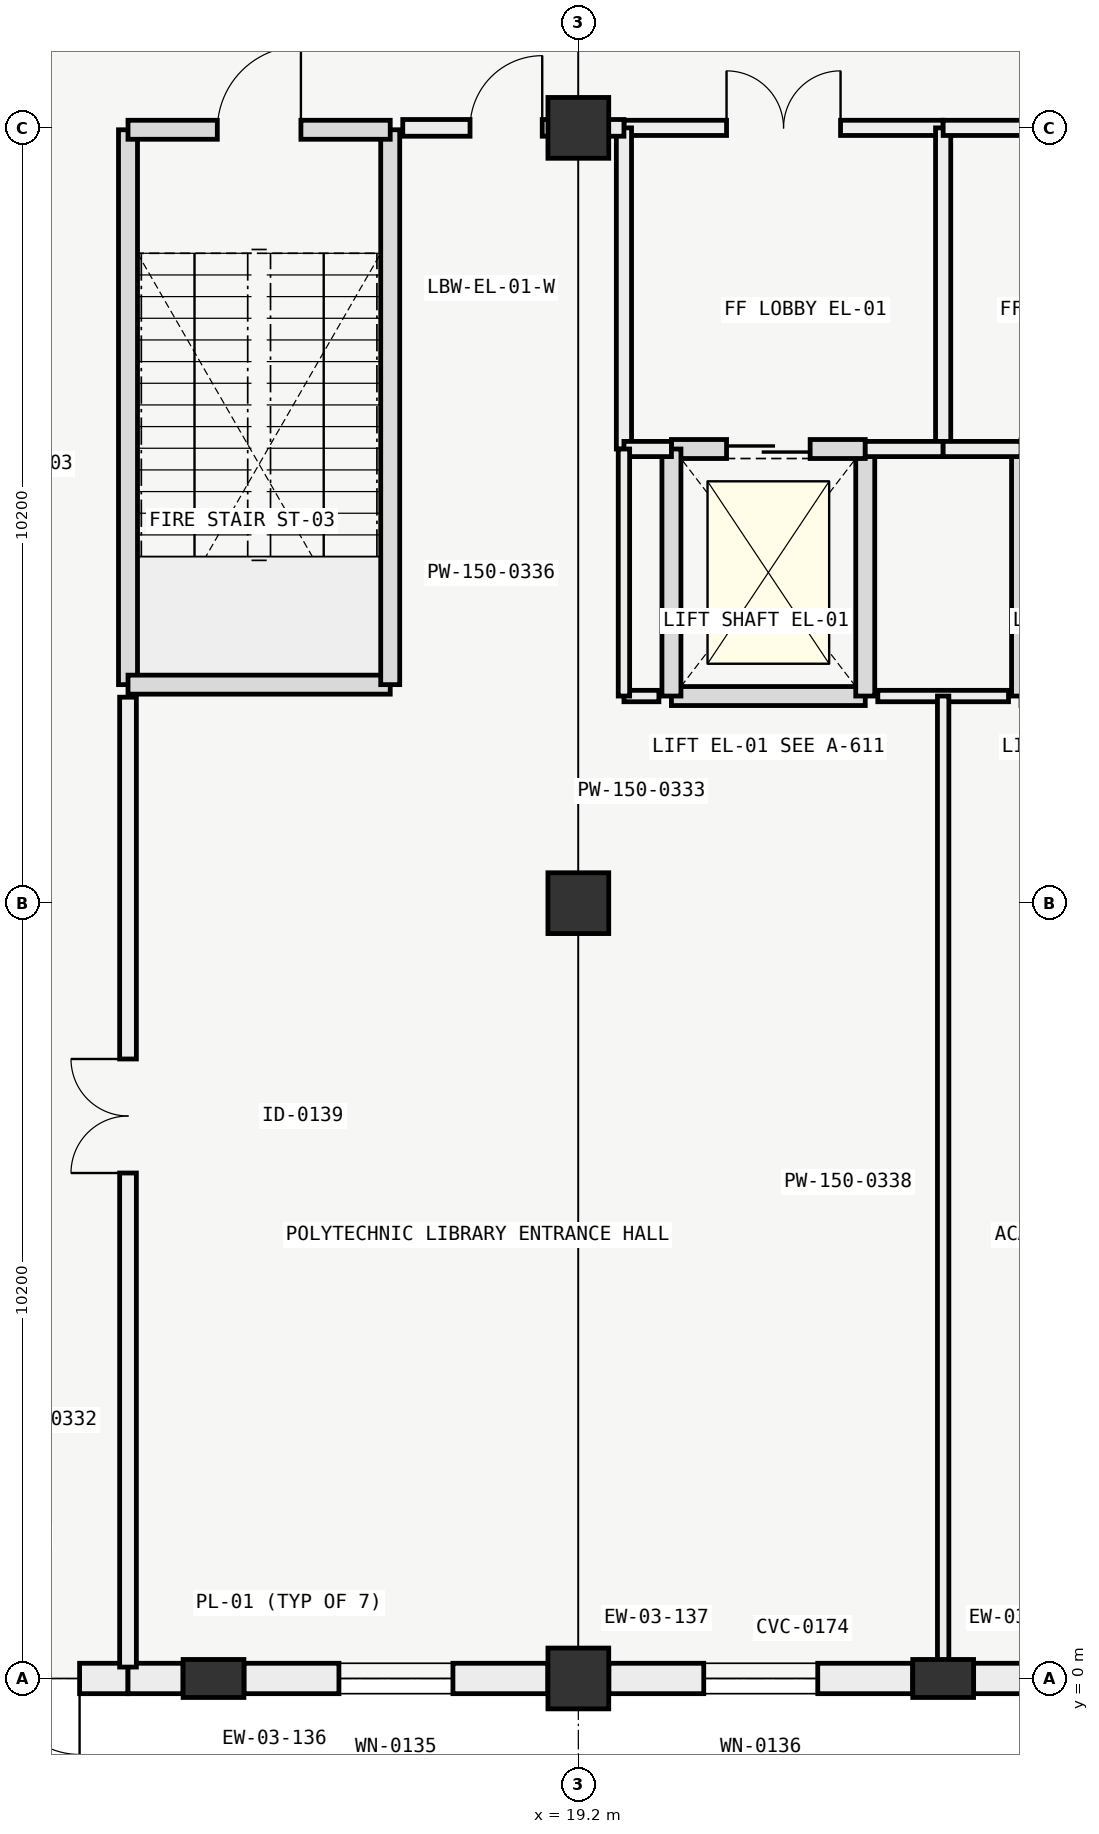
"""IFC4 building model, lengths in metres.
Left out: names, types, materials, properties, quantities, classifications, styles, units other than length and angle.
Written with IfcOpenShell. Run it as: python <this file> out.ifc"""

import sys

from ifc_helpers import new_model, si_unit, direction, frame, frame_2d, origin, origin_2d, place, context, subcontext, project, spatial, rectangle, extrude, element, fill, save


model = new_model("IFC4")
c1 = context("Model", 3, precision=1e-05, world=origin(), true_north=direction((0.0, 1.0)))
c2 = subcontext(c1, "Body", "Model", "MODEL_VIEW")
j1 = project(units=[si_unit("LENGTHUNIT", "METRE"), si_unit("PLANEANGLEUNIT", "RADIAN")], contexts=[c1])
p1 = place(None, origin())
s1 = spatial("IfcSite", under=j1, at=p1, CompositionType="ELEMENT")
p2 = place(p1, origin())
s2 = spatial("IfcBuilding", under=s1, at=p2, CompositionType="ELEMENT")
p3 = place(p2, origin())
s3 = spatial("IfcBuildingStorey", under=s2, at=p3, CompositionType="ELEMENT", Elevation=0.0)
for number, where, z_axis, x_axis in (
    (1, (19.2, 0.0, 0.0), (0.0, 0.0, 1.0), (1.0, 0.0, 0.0)),
    (2, (19.2, 10.2, 0.0), (0.0, 0.0, 1.0), (1.0, 0.0, 0.0)),
    (3, (19.2, 20.4, 0.0), (0.0, 0.0, 1.0), (1.0, 0.0, 0.0)),
):
    element("IfcColumn", number, at=place(p3, frame(where, z_axis=z_axis, x_axis=x_axis)), inside=s3, PredefinedType="COLUMN", context=c2, shape_type="SweptSolid", body=[
        extrude(rectangle(XDim=0.8, YDim=0.8, at=origin_2d()), origin(), (0.0, 0.0, 1.0), 5.4),
    ])
for number, where, z_axis, x_axis in (
    (4, (14.4, 0.0, 0.0), (0.0, 0.0, 1.0), (0.0, 1.0, 0.0)),
    (5, (24.0, 0.0, 0.0), (0.0, 0.0, 1.0), (0.0, 1.0, 0.0)),
):
    element("IfcColumn", number, at=place(p3, frame(where, z_axis=z_axis, x_axis=x_axis)), inside=s3, PredefinedType="PILASTER", context=c2, shape_type="SweptSolid", body=[
        extrude(rectangle(XDim=0.5, YDim=0.8, at=origin_2d()), origin(), (0.0, 0.0, 1.0), 5.4),
    ])
p4 = place(p3, frame((13.275, 0.0, 0.0), z_axis=(0.0, 0.0, 1.0), x_axis=(-1.0, 0.0, 0.0)))
e6 = element("IfcWall", 6, at=p4, inside=s3, PredefinedType="SOLIDWALL", context=c2, shape_type="SweptSolid", body=[
    extrude(rectangle(XDim=3.274, YDim=0.4, at=frame_2d((1.637, 0.0))), origin(), (0.0, 0.0, 1.0), 3.58),
])
p5 = place(p4, frame((0.637, 0.0, 0.0)))
e7 = element("IfcOpeningElement", 7, at=p5, cuts=e6, PredefinedType="OPENING", context=c2, shape_type="SweptSolid", body=[
    extrude(rectangle(XDim=2.0, YDim=2.4, at=frame_2d((1.0, 1.2))), frame((0.0, 0.21, 0.0), z_axis=(0.0, -1.0, 0.0), x_axis=(1.0, 0.0, 0.0)), (0.0, 0.0, 1.0), 0.42),
])
p6 = place(p3, frame((13.999, 0.0, 0.0), z_axis=(0.0, 0.0, 1.0), x_axis=(-1.0, 0.0, 0.0)))
e8 = element("IfcWall", 8, at=p6, inside=s3, PredefinedType="SOLIDWALL", context=c2, shape_type="SweptSolid", body=[
    extrude(rectangle(XDim=0.724, YDim=0.4, at=frame_2d((0.362, 0.0))), origin(), (0.0, 0.0, 1.0), 3.58),
])
p7 = place(p3, frame((18.799, 0.0, 0.0), z_axis=(0.0, 0.0, 1.0), x_axis=(-1.0, 0.0, 0.0)))
e9 = element("IfcWall", 9, at=p7, inside=s3, PredefinedType="SOLIDWALL", context=c2, shape_type="SweptSolid", body=[
    extrude(rectangle(XDim=3.998, YDim=0.4, at=frame_2d((1.999, 0.0))), origin(), (0.0, 0.0, 1.0), 3.58),
])
p8 = place(p7, frame((1.249, 0.0, 0.8)))
e10 = element("IfcOpeningElement", 10, at=p8, cuts=e9, PredefinedType="OPENING", context=c2, shape_type="SweptSolid", body=[
    extrude(rectangle(XDim=1.5, YDim=2.6, at=frame_2d((0.75, 1.3))), frame((0.0, 0.21, 0.0), z_axis=(0.0, -1.0, 0.0), x_axis=(1.0, 0.0, 0.0)), (0.0, 0.0, 1.0), 0.42),
])
p9 = place(p3, frame((23.599, 0.0, 0.0), z_axis=(0.0, 0.0, 1.0), x_axis=(-1.0, 0.0, 0.0)))
e11 = element("IfcWall", 11, at=p9, inside=s3, PredefinedType="SOLIDWALL", context=c2, shape_type="SweptSolid", body=[
    extrude(rectangle(XDim=3.998, YDim=0.4, at=frame_2d((1.999, 0.0))), origin(), (0.0, 0.0, 1.0), 3.63),
])
p10 = place(p9, frame((1.249, 0.0, 0.8)))
e12 = element("IfcOpeningElement", 12, at=p10, cuts=e11, PredefinedType="OPENING", context=c2, shape_type="SweptSolid", body=[
    extrude(rectangle(XDim=1.5, YDim=2.6, at=frame_2d((0.75, 1.3))), frame((0.0, 0.21, 0.0), z_axis=(0.0, -1.0, 0.0), x_axis=(1.0, 0.0, 0.0)), (0.0, 0.0, 1.0), 0.42),
])
p11 = place(p3, frame((28.399, 0.0, 0.0), z_axis=(0.0, 0.0, 1.0), x_axis=(-1.0, 0.0, 0.0)))
e13 = element("IfcWall", 13, at=p11, inside=s3, PredefinedType="SOLIDWALL", context=c2, shape_type="SweptSolid", body=[
    extrude(rectangle(XDim=3.998, YDim=0.4, at=frame_2d((1.999, 0.0))), origin(), (0.0, 0.0, 1.0), 3.63),
])
p12 = place(p11, frame((1.249, 0.0, 0.8)))
e14 = element("IfcOpeningElement", 14, at=p12, cuts=e13, PredefinedType="OPENING", context=c2, shape_type="SweptSolid", body=[
    extrude(rectangle(XDim=1.5, YDim=2.6, at=frame_2d((0.75, 1.3))), frame((0.0, 0.21, 0.0), z_axis=(0.0, -1.0, 0.0), x_axis=(1.0, 0.0, 0.0)), (0.0, 0.0, 1.0), 0.42),
])
p13 = place(p3, frame((13.275, 20.375, 0.0), z_axis=(0.0, 0.0, 1.0), x_axis=(0.0, -1.0, 0.0)))
e15 = element("IfcWall", 15, at=p13, inside=s3, PredefinedType="SOLIDWALL", context=c2, shape_type="SweptSolid", body=[
    extrude(rectangle(XDim=7.3, YDim=0.25, at=frame_2d((3.65, 0.0))), origin(), (0.0, 0.0, 1.0), 5.12),
])
p14 = place(p3, frame((13.275, 13.075, 0.0), z_axis=(0.0, 0.0, 1.0), x_axis=(1.0, 0.0, 0.0)))
e16 = element("IfcWall", 16, at=p14, inside=s3, PredefinedType="SOLIDWALL", context=c2, shape_type="SweptSolid", body=[
    extrude(rectangle(XDim=3.45, YDim=0.25, at=frame_2d((1.725, 0.0))), origin(), (0.0, 0.0, 1.0), 5.12),
])
p15 = place(p3, frame((16.725, 13.075, 0.0), z_axis=(0.0, 0.0, 1.0), x_axis=(0.0, 1.0, 0.0)))
e17 = element("IfcWall", 17, at=p15, inside=s3, PredefinedType="SOLIDWALL", context=c2, shape_type="SweptSolid", body=[
    extrude(rectangle(XDim=7.3, YDim=0.25, at=frame_2d((3.65, 0.0))), origin(), (0.0, 0.0, 1.0), 5.12),
])
p16 = place(p3, frame((13.275, 20.375, 0.0), z_axis=(0.0, 0.0, 1.0), x_axis=(1.0, 0.0, 0.0)))
e18 = element("IfcWall", 18, at=p16, inside=s3, PredefinedType="SOLIDWALL", context=c2, shape_type="SweptSolid", body=[
    extrude(rectangle(XDim=3.45, YDim=0.25, at=frame_2d((1.725, 0.0))), origin(), (0.0, 0.0, 1.0), 5.12),
])
p17 = place(p16, frame((1.175, 0.0, 0.0)))
e19 = element("IfcOpeningElement", 19, at=p17, cuts=e18, PredefinedType="OPENING", context=c2, shape_type="SweptSolid", body=[
    extrude(rectangle(XDim=1.1, YDim=2.2, at=frame_2d((0.55, 1.1))), frame((0.0, 0.135, 0.0), z_axis=(0.0, -1.0, 0.0), x_axis=(1.0, 0.0, 0.0)), (0.0, 0.0, 1.0), 0.27),
])
p18 = place(p3, frame((20.425, 12.925, 0.0), z_axis=(0.0, 0.0, 1.0), x_axis=(1.0, 0.0, 0.0)))
e20 = element("IfcWall", 20, at=p18, inside=s3, PredefinedType="SOLIDWALL", context=c2, shape_type="SweptSolid", body=[
    extrude(rectangle(XDim=2.55, YDim=0.25, at=frame_2d((1.275, 0.0))), origin(), (0.0, 0.0, 1.0), 5.12),
])
p19 = place(p3, frame((22.975, 12.925, 0.0), z_axis=(0.0, 0.0, 1.0), x_axis=(0.0, 1.0, 0.0)))
e21 = element("IfcWall", 21, at=p19, inside=s3, PredefinedType="SOLIDWALL", context=c2, shape_type="SweptSolid", body=[
    extrude(rectangle(XDim=3.25, YDim=0.25, at=frame_2d((1.625, 0.0))), origin(), (0.0, 0.0, 1.0), 5.12),
])
p20 = place(p3, frame((22.975, 16.175, 0.0), z_axis=(0.0, 0.0, 1.0), x_axis=(-1.0, 0.0, 0.0)))
e22 = element("IfcWall", 22, at=p20, inside=s3, PredefinedType="SOLIDWALL", context=c2, shape_type="SweptSolid", body=[
    extrude(rectangle(XDim=2.55, YDim=0.25, at=frame_2d((1.275, 0.0))), origin(), (0.0, 0.0, 1.0), 5.12),
])
p21 = place(p20, frame((0.725, 0.0, 0.0)))
e23 = element("IfcOpeningElement", 23, at=p21, cuts=e22, PredefinedType="OPENING", context=c2, shape_type="SweptSolid", body=[
    extrude(rectangle(XDim=1.1, YDim=2.1, at=frame_2d((0.55, 1.05))), frame((0.0, 0.135, 0.0), z_axis=(0.0, -1.0, 0.0), x_axis=(1.0, 0.0, 0.0)), (0.0, 0.0, 1.0), 0.27),
])
p22 = place(p3, frame((20.425, 16.175, 0.0), z_axis=(0.0, 0.0, 1.0), x_axis=(0.0, -1.0, 0.0)))
e24 = element("IfcWall", 24, at=p22, inside=s3, PredefinedType="SOLIDWALL", context=c2, shape_type="SweptSolid", body=[
    extrude(rectangle(XDim=3.25, YDim=0.25, at=frame_2d((1.625, 0.0))), origin(), (0.0, 0.0, 1.0), 5.12),
])
p23 = place(p3, frame((19.8, 20.4, 0.0), z_axis=(0.0, 0.0, 1.0), x_axis=(1.0, 0.0, 0.0)))
e25 = element("IfcWall", 25, at=p23, inside=s3, PredefinedType="PARTITIONING", context=c2, shape_type="SweptSolid", body=[
    extrude(rectangle(XDim=4.2, YDim=0.2, at=frame_2d((2.1, 0.0))), origin(), (0.0, 0.0, 1.0), 4.4),
])
p24 = place(p23, frame((1.35, 0.0, 0.0)))
e26 = element("IfcOpeningElement", 26, at=p24, cuts=e25, PredefinedType="OPENING", context=c2, shape_type="SweptSolid", body=[
    extrude(rectangle(XDim=1.5, YDim=2.2, at=frame_2d((0.75, 1.1))), frame((0.0, 0.11, 0.0), z_axis=(0.0, -1.0, 0.0), x_axis=(1.0, 0.0, 0.0)), (0.0, 0.0, 1.0), 0.22),
])
for number, where, z_axis, x_axis in (
    (27, (19.8, 16.175, 0.0), (0.0, 0.0, 1.0), (0.0, 1.0, 0.0)),
    (28, (24.0, 16.175, 0.0), (0.0, 0.0, 1.0), (0.0, 1.0, 0.0)),
):
    element("IfcWall", number, at=place(p3, frame(where, z_axis=z_axis, x_axis=x_axis)), inside=s3, PredefinedType="PARTITIONING", context=c2, shape_type="SweptSolid", body=[
        extrude(rectangle(XDim=4.225, YDim=0.2, at=frame_2d((2.112, 0.0))), origin(), (0.0, 0.0, 1.0), 4.4),
    ])
p25 = place(p3, frame((19.8, 16.175, 0.0), z_axis=(0.0, 0.0, 1.0), x_axis=(1.0, 0.0, 0.0)))
e29 = element("IfcWall", 29, at=p25, inside=s3, PredefinedType="PARTITIONING", context=c2, shape_type="SweptSolid", body=[
    extrude(rectangle(XDim=0.625, YDim=0.2, at=frame_2d((0.312, 0.0))), origin(), (0.0, 0.0, 1.0), 4.75),
])
p26 = place(p3, frame((22.975, 16.175, 0.0), z_axis=(0.0, 0.0, 1.0), x_axis=(1.0, 0.0, 0.0)))
e30 = element("IfcWall", 30, at=p26, inside=s3, PredefinedType="PARTITIONING", context=c2, shape_type="SweptSolid", body=[
    extrude(rectangle(XDim=1.025, YDim=0.2, at=frame_2d((0.512, 0.0))), origin(), (0.0, 0.0, 1.0), 4.75),
])
p27 = place(p3, frame((25.025, 16.175, 0.0), z_axis=(0.0, 0.0, 1.0), x_axis=(0.0, -1.0, 0.0)))
e31 = element("IfcWall", 31, at=p27, inside=s3, PredefinedType="SOLIDWALL", context=c2, shape_type="SweptSolid", body=[
    extrude(rectangle(XDim=3.25, YDim=0.25, at=frame_2d((1.625, 0.0))), origin(), (0.0, 0.0, 1.0), 5.12),
])
p28 = place(p3, frame((24.0, 20.4, 0.0), z_axis=(0.0, 0.0, 1.0), x_axis=(1.0, 0.0, 0.0)))
e32 = element("IfcWall", 32, at=p28, inside=s3, PredefinedType="PARTITIONING", context=c2, shape_type="SweptSolid", body=[
    extrude(rectangle(XDim=4.2, YDim=0.2, at=frame_2d((2.1, 0.0))), origin(), (0.0, 0.0, 1.0), 4.4),
])
p29 = place(p28, frame((1.35, 0.0, 0.0)))
e33 = element("IfcOpeningElement", 33, at=p29, cuts=e32, PredefinedType="OPENING", context=c2, shape_type="SweptSolid", body=[
    extrude(rectangle(XDim=1.5, YDim=2.2, at=frame_2d((0.75, 1.1))), frame((0.0, 0.11, 0.0), z_axis=(0.0, -1.0, 0.0), x_axis=(1.0, 0.0, 0.0)), (0.0, 0.0, 1.0), 0.22),
])
p30 = place(p3, frame((24.0, 16.175, 0.0), z_axis=(0.0, 0.0, 1.0), x_axis=(1.0, 0.0, 0.0)))
e34 = element("IfcWall", 34, at=p30, inside=s3, PredefinedType="PARTITIONING", context=c2, shape_type="SweptSolid", body=[
    extrude(rectangle(XDim=1.025, YDim=0.2, at=frame_2d((0.512, 0.0))), origin(), (0.0, 0.0, 1.0), 4.75),
])
p31 = place(p3, frame((13.275, 0.15, 0.0), z_axis=(0.0, 0.0, 1.0), x_axis=(0.0, 1.0, 0.0)))
e35 = element("IfcWall", 35, at=p31, inside=s3, PredefinedType="PARTITIONING", context=c2, shape_type="SweptSolid", body=[
    extrude(rectangle(XDim=12.76, YDim=0.22, at=frame_2d((6.38, 0.0))), origin(), (0.0, 0.0, 1.0), 4.4),
])
p32 = place(p31, frame((6.5, 0.0, 0.0)))
e36 = element("IfcOpeningElement", 36, at=p32, cuts=e35, PredefinedType="OPENING", context=c2, shape_type="SweptSolid", body=[
    extrude(rectangle(XDim=1.5, YDim=2.2, at=frame_2d((0.75, 1.1))), frame((0.0, 0.12, 0.0), z_axis=(0.0, -1.0, 0.0), x_axis=(1.0, 0.0, 0.0)), (0.0, 0.0, 1.0), 0.24),
])
p33 = place(p3, frame((19.8, 12.925, 0.0), z_axis=(0.0, 0.0, 1.0), x_axis=(1.0, 0.0, 0.0)))
e37 = element("IfcWall", 37, at=p33, inside=s3, PredefinedType="PARTITIONING", context=c2, shape_type="SweptSolid", body=[
    extrude(rectangle(XDim=0.46, YDim=0.15, at=frame_2d((0.23, 0.0))), origin(), (0.0, 0.0, 1.0), 5.05),
])
p34 = place(p3, frame((23.14, 12.925, 0.0), z_axis=(0.0, 0.0, 1.0), x_axis=(1.0, 0.0, 0.0)))
e38 = element("IfcWall", 38, at=p34, inside=s3, PredefinedType="PARTITIONING", context=c2, shape_type="SweptSolid", body=[
    extrude(rectangle(XDim=1.72, YDim=0.15, at=frame_2d((0.86, 0.0))), origin(), (0.0, 0.0, 1.0), 5.05),
])
p35 = place(p3, frame((19.8, 12.925, 0.0), z_axis=(0.0, 0.0, 1.0), x_axis=(0.0, 1.0, 0.0)))
e39 = element("IfcWall", 39, at=p35, inside=s3, PredefinedType="PARTITIONING", context=c2, shape_type="SweptSolid", body=[
    extrude(rectangle(XDim=3.25, YDim=0.15, at=frame_2d((1.625, 0.0))), origin(), (0.0, 0.0, 1.0), 5.05),
])
p36 = place(p3, frame((16.89, 20.4, 0.0), z_axis=(0.0, 0.0, 1.0), x_axis=(1.0, 0.0, 0.0)))
e40 = element("IfcWall", 40, at=p36, inside=s3, PredefinedType="PARTITIONING", context=c2, shape_type="SweptSolid", body=[
    extrude(rectangle(XDim=2.91, YDim=0.22, at=frame_2d((1.455, 0.0))), origin(), (0.0, 0.0, 1.0), 4.4),
])
p37 = place(p36, frame((0.885, 0.0, 0.0)))
e41 = element("IfcOpeningElement", 41, at=p37, cuts=e40, PredefinedType="OPENING", context=c2, shape_type="SweptSolid", body=[
    extrude(rectangle(XDim=0.95, YDim=2.1, at=frame_2d((0.475, 1.05))), frame((0.0, 0.12, 0.0), z_axis=(0.0, -1.0, 0.0), x_axis=(1.0, 0.0, 0.0)), (0.0, 0.0, 1.0), 0.24),
])
p38 = place(p3, frame((24.0, 0.15, 0.0), z_axis=(0.0, 0.0, 1.0), x_axis=(0.0, 1.0, 0.0)))
e42 = element("IfcWall", 42, at=p38, inside=s3, PredefinedType="PARTITIONING", context=c2, shape_type="SweptSolid", body=[
    extrude(rectangle(XDim=12.775, YDim=0.15, at=frame_2d((6.388, 0.0))), origin(), (0.0, 0.0, 1.0), 4.4),
])
p39 = place(p5, origin())
e43 = element("IfcDoor", 43, at=p39, inside=s3, OperationType="DOUBLE_DOOR_SINGLE_SWING", PredefinedType="DOOR", context=c2, shape_type="SweptSolid", body=[
    extrude(rectangle(XDim=2.0, YDim=2.4, at=frame_2d((1.0, 1.2))), frame((0.0, 0.025, 0.0), z_axis=(0.0, -1.0, 0.0), x_axis=(1.0, 0.0, 0.0)), (0.0, 0.0, 1.0), 0.05),
])
fill(e7, e43)
p40 = place(p8, origin())
e44 = element("IfcWindow", 44, at=p40, inside=s3, PartitioningType="SINGLE_PANEL", PredefinedType="WINDOW", context=c2, shape_type="SweptSolid", body=[
    extrude(rectangle(XDim=1.5, YDim=2.6, at=frame_2d((0.75, 1.3))), frame((0.0, 0.03, 0.0), z_axis=(0.0, -1.0, 0.0), x_axis=(1.0, 0.0, 0.0)), (0.0, 0.0, 1.0), 0.06),
])
fill(e10, e44)
p41 = place(p10, origin())
e45 = element("IfcWindow", 45, at=p41, inside=s3, PartitioningType="SINGLE_PANEL", PredefinedType="WINDOW", context=c2, shape_type="SweptSolid", body=[
    extrude(rectangle(XDim=1.5, YDim=2.6, at=frame_2d((0.75, 1.3))), frame((0.0, 0.03, 0.0), z_axis=(0.0, -1.0, 0.0), x_axis=(1.0, 0.0, 0.0)), (0.0, 0.0, 1.0), 0.06),
])
fill(e12, e45)
p42 = place(p17, origin())
e46 = element("IfcDoor", 46, at=p42, inside=s3, OperationType="SINGLE_SWING_RIGHT", PredefinedType="DOOR", context=c2, shape_type="SweptSolid", body=[
    extrude(rectangle(XDim=1.1, YDim=2.2, at=frame_2d((0.55, 1.1))), frame((0.0, 0.025, 0.0), z_axis=(0.0, -1.0, 0.0), x_axis=(1.0, 0.0, 0.0)), (0.0, 0.0, 1.0), 0.05),
])
fill(e19, e46)
p43 = place(p21, origin())
e47 = element("IfcDoor", 47, at=p43, inside=s3, OperationType="SLIDING_TO_LEFT", PredefinedType="DOOR", context=c2, shape_type="SweptSolid", body=[
    extrude(rectangle(XDim=1.1, YDim=2.1, at=frame_2d((0.55, 1.05))), frame((0.0, 0.025, 0.0), z_axis=(0.0, -1.0, 0.0), x_axis=(1.0, 0.0, 0.0)), (0.0, 0.0, 1.0), 0.05),
])
fill(e23, e47)
p44 = place(p24, origin())
e48 = element("IfcDoor", 48, at=p44, inside=s3, OperationType="SINGLE_SWING_LEFT", PredefinedType="DOOR", context=c2, shape_type="SweptSolid", body=[
    extrude(rectangle(XDim=1.5, YDim=2.2, at=frame_2d((0.75, 1.1))), frame((0.0, 0.025, 0.0), z_axis=(0.0, -1.0, 0.0), x_axis=(1.0, 0.0, 0.0)), (0.0, 0.0, 1.0), 0.05),
])
fill(e26, e48)
p45 = place(p32, origin())
e49 = element("IfcDoor", 49, at=p45, inside=s3, OperationType="DOUBLE_DOOR_SINGLE_SWING", PredefinedType="DOOR", context=c2, shape_type="SweptSolid", body=[
    extrude(rectangle(XDim=1.5, YDim=2.2, at=frame_2d((0.75, 1.1))), frame((0.0, 0.025, 0.0), z_axis=(0.0, -1.0, 0.0), x_axis=(1.0, 0.0, 0.0)), (0.0, 0.0, 1.0), 0.05),
])
fill(e36, e49)
p46 = place(p37, origin())
e50 = element("IfcDoor", 50, at=p46, inside=s3, OperationType="SINGLE_SWING_RIGHT", PredefinedType="DOOR", context=c2, shape_type="SweptSolid", body=[
    extrude(rectangle(XDim=0.95, YDim=2.1, at=frame_2d((0.475, 1.05))), frame((0.0, 0.025, 0.0), z_axis=(0.0, -1.0, 0.0), x_axis=(1.0, 0.0, 0.0)), (0.0, 0.0, 1.0), 0.05),
])
fill(e41, e50)
save(model, sys.argv[1])
